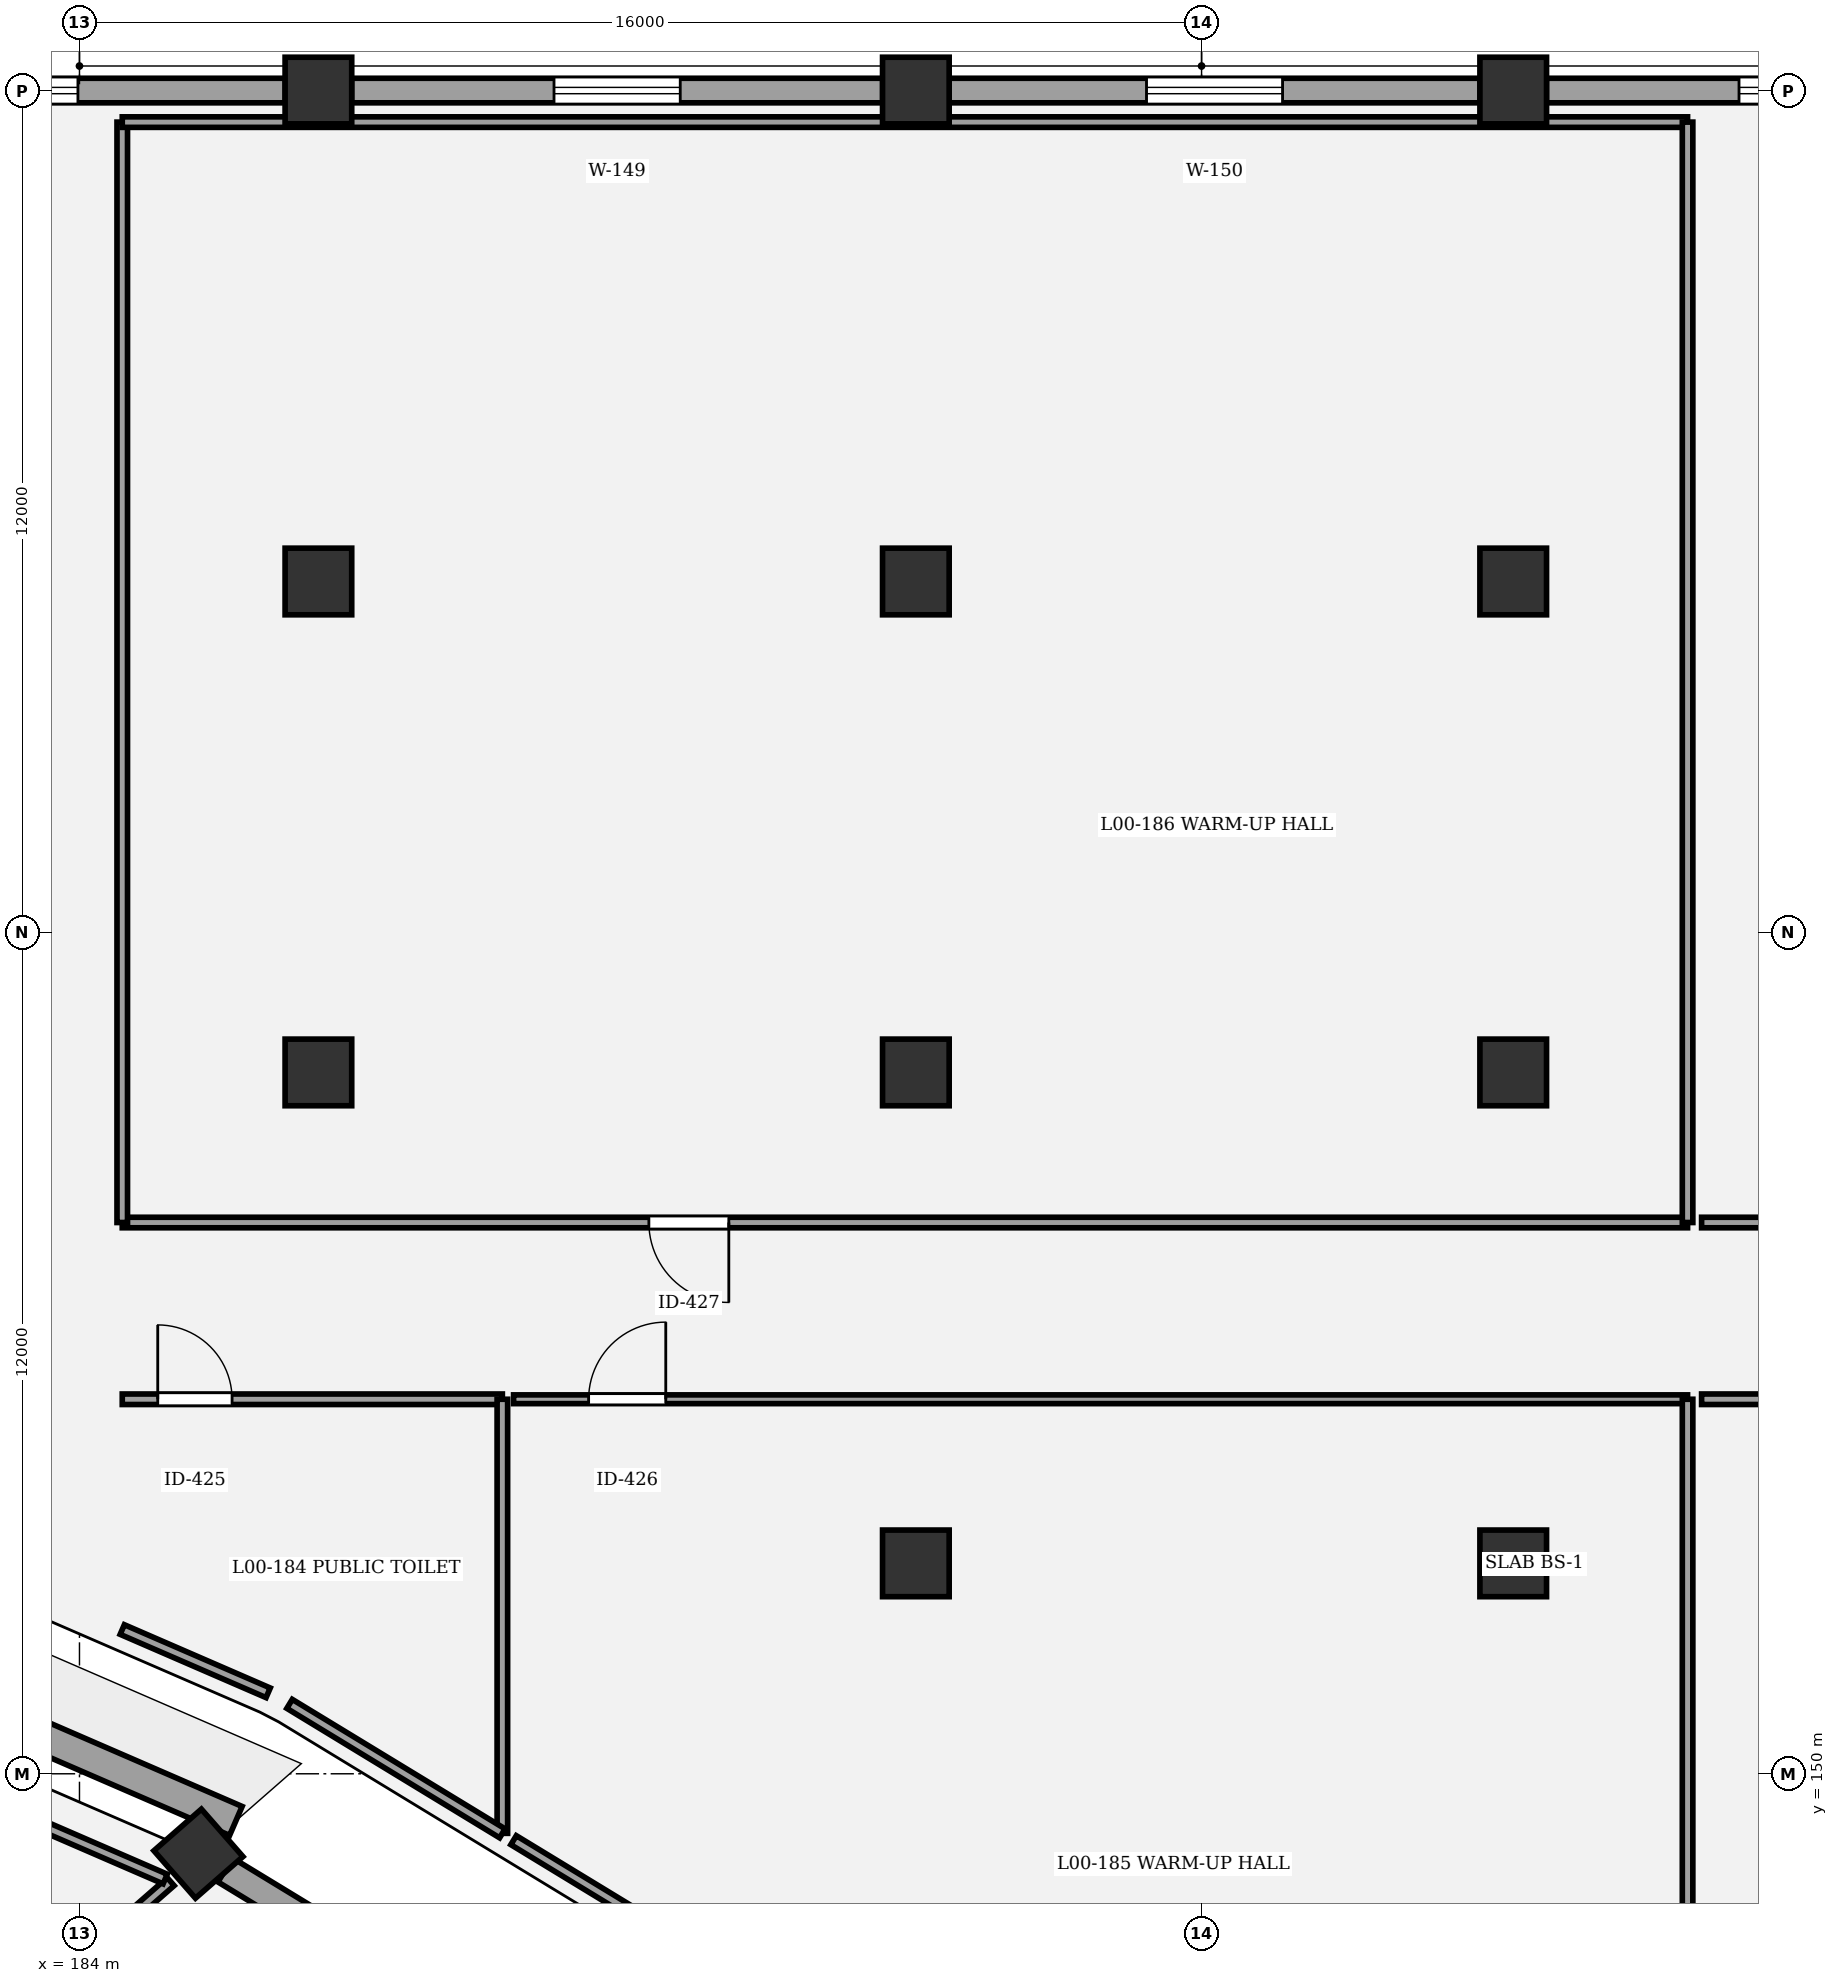
"""IFC4 building model, lengths in metres.
Left out: names, types, materials, properties, quantities, classifications, styles, units other than length and angle.
Written with IfcOpenShell. Run it as: python <this file> out.ifc"""

import sys

from ifc_helpers import new_model, si_unit, direction, frame, frame_2d, origin, origin_2d, place, context, subcontext, project, spatial, rectangle, circle, extrude, element, fill, save


model = new_model("IFC4")
c1 = context("Model", 3, precision=1e-05, world=origin(), true_north=direction((0.0, 1.0)))
c2 = subcontext(c1, "Body", "Model", "MODEL_VIEW")
j1 = project(units=[si_unit("LENGTHUNIT", "METRE"), si_unit("PLANEANGLEUNIT", "RADIAN")], contexts=[c1])
p1 = place(None, origin())
s1 = spatial("IfcSite", under=j1, at=p1, CompositionType="ELEMENT")
p2 = place(p1, origin())
s2 = spatial("IfcBuilding", under=s1, at=p2, CompositionType="ELEMENT")
p3 = place(p2, origin())
s3 = spatial("IfcBuildingStorey", under=s2, at=p3, CompositionType="ELEMENT", Elevation=0.0)
p4 = place(p3, frame((185.696, 148.861, 0.0), z_axis=(0.0, 0.0, 1.0), x_axis=(0.752529860433, 0.658558128912, 0.0)))
e1 = element("IfcColumn", 1, at=p4, inside=s3, PredefinedType="COLUMN", context=c2, shape_type="SweptSolid", body=[
    extrude(rectangle(XDim=0.9, YDim=0.9, at=origin_2d()), origin(), (0.0, 0.0, 1.0), 5.4),
])
for number, where, z_axis, x_axis in (
    (2, (187.407, 160.0, 0.0), (0.0, 0.0, 1.0), (1.0, 0.0, 0.0)),
    (3, (187.407, 167.0, 0.0), (0.0, 0.0, 1.0), (1.0, 0.0, 0.0)),
    (4, (187.407, 174.0, 0.0), (0.0, 0.0, 1.0), (1.0, 0.0, 0.0)),
    (5, (195.926, 153.0, 0.0), (0.0, 0.0, 1.0), (1.0, 0.0, 0.0)),
    (6, (195.926, 160.0, 0.0), (0.0, 0.0, 1.0), (1.0, 0.0, 0.0)),
    (7, (195.926, 167.0, 0.0), (0.0, 0.0, 1.0), (1.0, 0.0, 0.0)),
    (8, (195.926, 174.0, 0.0), (0.0, 0.0, 1.0), (1.0, 0.0, 0.0)),
    (9, (204.444, 153.0, 0.0), (0.0, 0.0, 1.0), (1.0, 0.0, 0.0)),
    (10, (204.444, 160.0, 0.0), (0.0, 0.0, 1.0), (1.0, 0.0, 0.0)),
    (11, (204.444, 167.0, 0.0), (0.0, 0.0, 1.0), (1.0, 0.0, 0.0)),
    (12, (204.444, 174.0, 0.0), (0.0, 0.0, 1.0), (1.0, 0.0, 0.0)),
):
    element("IfcColumn", number, at=place(p3, frame(where, z_axis=z_axis, x_axis=x_axis)), inside=s3, PredefinedType="COLUMN", context=c2, shape_type="SweptSolid", body=[
        extrude(circle(Radius=0.475, at=origin_2d()), origin(), (0.0, 0.0, 1.0), 5.4),
    ])
p5 = place(p3, frame((186.23, 149.328, 0.0), z_axis=(0.0, 0.0, 1.0), x_axis=(-0.917502700529, 0.397729549471, 0.0)))
e13 = element("IfcWall", 13, at=p5, inside=s3, PredefinedType="USERDEFINED", context=c2, shape_type="SweptSolid", body=[
    extrude(rectangle(XDim=10.716, YDim=0.45, at=frame_2d((5.358, 0.0))), origin(), (0.0, 0.0, 1.0), 4.25),
])
p6 = place(p3, frame((186.079, 148.628, 0.0), z_axis=(0.0, 0.0, 1.0), x_axis=(0.854319454423, -0.519748275413, 0.0)))
e14 = element("IfcWall", 14, at=p6, inside=s3, PredefinedType="STANDARD", context=c2, shape_type="SweptSolid", body=[
    extrude(rectangle(XDim=9.006, YDim=0.4, at=frame_2d((4.503, 0.0))), origin(), (0.0, 0.0, 1.0), 4.25),
])
p7 = place(p6, frame((3.303, 0.0, 0.0)))
e15 = element("IfcOpeningElement", 15, at=p7, cuts=e14, PredefinedType="OPENING", context=c2, shape_type="SweptSolid", body=[
    extrude(rectangle(XDim=2.4, YDim=2.55, at=frame_2d((1.2, 1.275))), frame((0.0, 0.21, 0.0), z_axis=(0.0, -1.0, 0.0), x_axis=(1.0, 0.0, 0.0)), (0.0, 0.0, 1.0), 0.42),
])
p8 = place(p3, frame((179.362, 174.0, 0.0), z_axis=(0.0, 0.0, 1.0), x_axis=(1.0, 0.0, 0.0)))
e16 = element("IfcWall", 16, at=p8, inside=s3, PredefinedType="STANDARD", context=c2, shape_type="SweptSolid", body=[
    extrude(rectangle(XDim=7.572, YDim=0.35, at=frame_2d((3.786, 0.0))), origin(), (0.0, 0.0, 1.0), 4.16),
])
p9 = place(p8, frame((2.956, 0.0, 0.9)))
e17 = element("IfcOpeningElement", 17, at=p9, cuts=e16, PredefinedType="OPENING", context=c2, shape_type="SweptSolid", body=[
    extrude(rectangle(XDim=1.66, YDim=1.75, at=frame_2d((0.83, 0.875))), frame((0.0, 0.185, 0.0), z_axis=(0.0, -1.0, 0.0), x_axis=(1.0, 0.0, 0.0)), (0.0, 0.0, 1.0), 0.37),
])
p10 = place(p3, frame((187.88, 174.0, 0.0), z_axis=(0.0, 0.0, 1.0), x_axis=(1.0, 0.0, 0.0)))
e18 = element("IfcWall", 18, at=p10, inside=s3, PredefinedType="STANDARD", context=c2, shape_type="SweptSolid", body=[
    extrude(rectangle(XDim=7.573, YDim=0.35, at=frame_2d((3.787, 0.0))), origin(), (0.0, 0.0, 1.0), 4.16),
])
p11 = place(p10, frame((2.886, 0.0, 0.9)))
e19 = element("IfcOpeningElement", 19, at=p11, cuts=e18, PredefinedType="OPENING", context=c2, shape_type="SweptSolid", body=[
    extrude(rectangle(XDim=1.8, YDim=1.75, at=frame_2d((0.9, 0.875))), frame((0.0, 0.185, 0.0), z_axis=(0.0, -1.0, 0.0), x_axis=(1.0, 0.0, 0.0)), (0.0, 0.0, 1.0), 0.37),
])
p12 = place(p3, frame((196.399, 174.0, 0.0), z_axis=(0.0, 0.0, 1.0), x_axis=(1.0, 0.0, 0.0)))
e20 = element("IfcWall", 20, at=p12, inside=s3, PredefinedType="STANDARD", context=c2, shape_type="SweptSolid", body=[
    extrude(rectangle(XDim=7.572, YDim=0.35, at=frame_2d((3.786, 0.0))), origin(), (0.0, 0.0, 1.0), 4.16),
])
p13 = place(p12, frame((2.816, 0.0, 0.9)))
e21 = element("IfcOpeningElement", 21, at=p13, cuts=e20, PredefinedType="OPENING", context=c2, shape_type="SweptSolid", body=[
    extrude(rectangle(XDim=1.94, YDim=1.75, at=frame_2d((0.97, 0.875))), frame((0.0, 0.185, 0.0), z_axis=(0.0, -1.0, 0.0), x_axis=(1.0, 0.0, 0.0)), (0.0, 0.0, 1.0), 0.37),
])
p14 = place(p3, frame((204.917, 174.0, 0.0), z_axis=(0.0, 0.0, 1.0), x_axis=(1.0, 0.0, 0.0)))
e22 = element("IfcWall", 22, at=p14, inside=s3, PredefinedType="STANDARD", context=c2, shape_type="SweptSolid", body=[
    extrude(rectangle(XDim=7.573, YDim=0.35, at=frame_2d((3.787, 0.0))), origin(), (0.0, 0.0, 1.0), 4.16),
])
p15 = place(p14, frame((2.747, 0.0, 0.9)))
e23 = element("IfcOpeningElement", 23, at=p15, cuts=e22, PredefinedType="OPENING", context=c2, shape_type="SweptSolid", body=[
    extrude(rectangle(XDim=2.08, YDim=1.75, at=frame_2d((1.04, 0.875))), frame((0.0, 0.185, 0.0), z_axis=(0.0, -1.0, 0.0), x_axis=(1.0, 0.0, 0.0)), (0.0, 0.0, 1.0), 0.37),
])
p16 = place(p3, frame((184.61, 155.34, 0.0), z_axis=(0.0, 0.0, 1.0), x_axis=(1.0, 0.0, 0.0)))
e24 = element("IfcWall", 24, at=p16, inside=s3, PredefinedType="PARTITIONING", context=c2, shape_type="SweptSolid", body=[
    extrude(rectangle(XDim=5.42, YDim=0.15, at=frame_2d((2.71, 0.0))), origin(), (0.0, 0.0, 1.0), 4.15),
])
p17 = place(p16, frame((0.506, 0.0, 0.0)))
e25 = element("IfcOpeningElement", 25, at=p17, cuts=e24, PredefinedType="OPENING", context=c2, shape_type="SweptSolid", body=[
    extrude(rectangle(XDim=1.06, YDim=2.3, at=frame_2d((0.53, 1.15))), frame((0.0, 0.085, 0.0), z_axis=(0.0, -1.0, 0.0), x_axis=(1.0, 0.0, 0.0)), (0.0, 0.0, 1.0), 0.17),
])
p18 = place(p3, frame((190.19, 155.34, 0.0), z_axis=(0.0, 0.0, 1.0), x_axis=(1.0, 0.0, 0.0)))
e26 = element("IfcWall", 26, at=p18, inside=s3, PredefinedType="PARTITIONING", context=c2, shape_type="SweptSolid", body=[
    extrude(rectangle(XDim=16.74, YDim=0.125, at=frame_2d((8.37, 0.0))), origin(), (0.0, 0.0, 1.0), 4.15),
])
p19 = place(p18, frame((1.07, 0.0, 0.0)))
e27 = element("IfcOpeningElement", 27, at=p19, cuts=e26, PredefinedType="OPENING", context=c2, shape_type="SweptSolid", body=[
    extrude(rectangle(XDim=1.1, YDim=2.3, at=frame_2d((0.55, 1.15))), frame((0.0, 0.073, 0.0), z_axis=(0.0, -1.0, 0.0), x_axis=(1.0, 0.0, 0.0)), (0.0, 0.0, 1.0), 0.145),
])
p20 = place(p3, frame((206.93, 157.86, 0.0), z_axis=(0.0, 0.0, 1.0), x_axis=(-1.0, 0.0, 0.0)))
e28 = element("IfcWall", 28, at=p20, inside=s3, PredefinedType="PARTITIONING", context=c2, shape_type="SweptSolid", body=[
    extrude(rectangle(XDim=22.32, YDim=0.15, at=frame_2d((11.16, 0.0))), origin(), (0.0, 0.0, 1.0), 4.15),
])
p21 = place(p20, frame((13.671, 0.0, 0.0)))
e29 = element("IfcOpeningElement", 29, at=p21, cuts=e28, PredefinedType="OPENING", context=c2, shape_type="SweptSolid", body=[
    extrude(rectangle(XDim=1.14, YDim=2.3, at=frame_2d((0.57, 1.15))), frame((0.0, 0.085, 0.0), z_axis=(0.0, -1.0, 0.0), x_axis=(1.0, 0.0, 0.0)), (0.0, 0.0, 1.0), 0.17),
])
p22 = place(p3, frame((216.5, 157.86, 0.0), z_axis=(0.0, 0.0, 1.0), x_axis=(-1.0, 0.0, 0.0)))
e30 = element("IfcWall", 30, at=p22, inside=s3, PredefinedType="PARTITIONING", context=c2, shape_type="SweptSolid", body=[
    extrude(rectangle(XDim=9.37, YDim=0.15, at=frame_2d((4.685, 0.0))), origin(), (0.0, 0.0, 1.0), 4.15),
])
p23 = place(p22, frame((6.964, 0.0, 0.0)))
e31 = element("IfcOpeningElement", 31, at=p23, cuts=e30, PredefinedType="OPENING", context=c2, shape_type="SweptSolid", body=[
    extrude(rectangle(XDim=1.18, YDim=2.3, at=frame_2d((0.59, 1.15))), frame((0.0, 0.085, 0.0), z_axis=(0.0, -1.0, 0.0), x_axis=(1.0, 0.0, 0.0)), (0.0, 0.0, 1.0), 0.17),
])
p24 = place(p3, frame((179.895, 143.731, 0.0), z_axis=(0.0, 0.0, 1.0), x_axis=(0.752564061831, 0.658519045162, 0.0)))
e32 = element("IfcWall", 32, at=p24, inside=s3, PredefinedType="PARTITIONING", context=c2, shape_type="SweptSolid", body=[
    extrude(rectangle(XDim=7.183, YDim=0.15, at=frame_2d((3.592, 0.0))), origin(), (0.0, 0.0, 1.0), 4.15),
])
p25 = place(p3, frame((176.189, 152.415, 0.0), z_axis=(0.0, 0.0, 1.0), x_axis=(0.917505556499, -0.397722961109, 0.0)))
e33 = element("IfcWall", 33, at=p25, inside=s3, PredefinedType="PARTITIONING", context=c2, shape_type="SweptSolid", body=[
    extrude(rectangle(XDim=9.845, YDim=0.15, at=frame_2d((4.922, 0.0))), origin(), (0.0, 0.0, 1.0), 4.15),
])
p26 = place(p3, frame((186.69, 151.155, 0.0), z_axis=(0.0, 0.0, 1.0), x_axis=(-0.917454774934, 0.397840088415, 0.0)))
e34 = element("IfcWall", 34, at=p26, inside=s3, PredefinedType="PARTITIONING", context=c2, shape_type="SweptSolid", body=[
    extrude(rectangle(XDim=2.268, YDim=0.15, at=frame_2d((1.134, 0.0))), origin(), (0.0, 0.0, 1.0), 4.15),
])
p27 = place(p3, frame((190.03, 155.34, 0.0), z_axis=(0.0, 0.0, 1.0), x_axis=(0.0, -1.0, 0.0)))
e35 = element("IfcWall", 35, at=p27, inside=s3, PredefinedType="PARTITIONING", context=c2, shape_type="SweptSolid", body=[
    extrude(rectangle(XDim=6.189, YDim=0.15, at=frame_2d((3.095, 0.0))), origin(), (0.0, 0.0, 1.0), 4.15),
])
p28 = place(p3, frame((190.03, 149.151, 0.0), z_axis=(0.0, 0.0, 1.0), x_axis=(-0.854335242099, 0.519722324042, 0.0)))
e36 = element("IfcWall", 36, at=p28, inside=s3, PredefinedType="PARTITIONING", context=c2, shape_type="SweptSolid", body=[
    extrude(rectangle(XDim=3.552, YDim=0.15, at=frame_2d((1.776, 0.0))), origin(), (0.0, 0.0, 1.0), 4.15),
])
p29 = place(p3, frame((195.455, 145.85, 0.0), z_axis=(0.0, 0.0, 1.0), x_axis=(-0.854341575167, 0.519711913411, 0.0)))
e37 = element("IfcWall", 37, at=p29, inside=s3, PredefinedType="PARTITIONING", context=c2, shape_type="SweptSolid", body=[
    extrude(rectangle(XDim=6.163, YDim=0.15, at=frame_2d((3.082, 0.0))), origin(), (0.0, 0.0, 1.0), 4.15),
])
p30 = place(p3, frame((206.93, 155.34, 0.0), z_axis=(0.0, 0.0, 1.0), x_axis=(0.0, -1.0, 0.0)))
e38 = element("IfcWall", 38, at=p30, inside=s3, PredefinedType="PARTITIONING", context=c2, shape_type="SweptSolid", body=[
    extrude(rectangle(XDim=20.434, YDim=0.15, at=frame_2d((10.217, 0.0))), origin(), (0.0, 0.0, 1.0), 4.15),
])
p31 = place(p3, frame((184.61, 157.86, 0.0), z_axis=(0.0, 0.0, 1.0), x_axis=(0.0, 1.0, 0.0)))
e39 = element("IfcWall", 39, at=p31, inside=s3, PredefinedType="PARTITIONING", context=c2, shape_type="SweptSolid", body=[
    extrude(rectangle(XDim=15.69, YDim=0.15, at=frame_2d((7.845, 0.0))), origin(), (0.0, 0.0, 1.0), 4.15),
])
p32 = place(p3, frame((184.61, 173.55, 0.0), z_axis=(0.0, 0.0, 1.0), x_axis=(1.0, 0.0, 0.0)))
e40 = element("IfcWall", 40, at=p32, inside=s3, PredefinedType="PARTITIONING", context=c2, shape_type="SweptSolid", body=[
    extrude(rectangle(XDim=22.32, YDim=0.15, at=frame_2d((11.16, 0.0))), origin(), (0.0, 0.0, 1.0), 4.15),
])
p33 = place(p3, frame((206.93, 173.55, 0.0), z_axis=(0.0, 0.0, 1.0), x_axis=(0.0, -1.0, 0.0)))
e41 = element("IfcWall", 41, at=p33, inside=s3, PredefinedType="PARTITIONING", context=c2, shape_type="SweptSolid", body=[
    extrude(rectangle(XDim=15.69, YDim=0.15, at=frame_2d((7.845, 0.0))), origin(), (0.0, 0.0, 1.0), 4.15),
])
p34 = place(p3, frame((207.13, 155.34, 0.0), z_axis=(0.0, 0.0, 1.0), x_axis=(0.999999951445, 0.000311623544, 0.0)))
e42 = element("IfcWall", 42, at=p34, inside=s3, PredefinedType="PARTITIONING", context=c2, shape_type="SweptSolid", body=[
    extrude(rectangle(XDim=9.401, YDim=0.15, at=frame_2d((4.701, 0.0))), origin(), (0.0, 0.0, 1.0), 4.15),
])
p35 = place(p9, origin())
e43 = element("IfcWindow", 43, at=p35, inside=s3, PartitioningType="SINGLE_PANEL", PredefinedType="WINDOW", context=c2, shape_type="SweptSolid", body=[
    extrude(rectangle(XDim=1.66, YDim=1.75, at=frame_2d((0.83, 0.875))), frame((0.0, 0.03, 0.0), z_axis=(0.0, -1.0, 0.0), x_axis=(1.0, 0.0, 0.0)), (0.0, 0.0, 1.0), 0.06),
])
fill(e17, e43)
p36 = place(p11, origin())
e44 = element("IfcWindow", 44, at=p36, inside=s3, PartitioningType="SINGLE_PANEL", PredefinedType="WINDOW", context=c2, shape_type="SweptSolid", body=[
    extrude(rectangle(XDim=1.8, YDim=1.75, at=frame_2d((0.9, 0.875))), frame((0.0, 0.03, 0.0), z_axis=(0.0, -1.0, 0.0), x_axis=(1.0, 0.0, 0.0)), (0.0, 0.0, 1.0), 0.06),
])
fill(e19, e44)
p37 = place(p13, origin())
e45 = element("IfcWindow", 45, at=p37, inside=s3, PartitioningType="SINGLE_PANEL", PredefinedType="WINDOW", context=c2, shape_type="SweptSolid", body=[
    extrude(rectangle(XDim=1.94, YDim=1.75, at=frame_2d((0.97, 0.875))), frame((0.0, 0.03, 0.0), z_axis=(0.0, -1.0, 0.0), x_axis=(1.0, 0.0, 0.0)), (0.0, 0.0, 1.0), 0.06),
])
fill(e21, e45)
p38 = place(p15, origin())
e46 = element("IfcWindow", 46, at=p38, inside=s3, PartitioningType="SINGLE_PANEL", PredefinedType="WINDOW", context=c2, shape_type="SweptSolid", body=[
    extrude(rectangle(XDim=2.08, YDim=1.75, at=frame_2d((1.04, 0.875))), frame((0.0, 0.03, 0.0), z_axis=(0.0, -1.0, 0.0), x_axis=(1.0, 0.0, 0.0)), (0.0, 0.0, 1.0), 0.06),
])
fill(e23, e46)
p39 = place(p17, origin())
e47 = element("IfcDoor", 47, at=p39, inside=s3, OperationType="SINGLE_SWING_LEFT", PredefinedType="DOOR", context=c2, shape_type="SweptSolid", body=[
    extrude(rectangle(XDim=1.06, YDim=2.3, at=frame_2d((0.53, 1.15))), frame((0.0, 0.025, 0.0), z_axis=(0.0, -1.0, 0.0), x_axis=(1.0, 0.0, 0.0)), (0.0, 0.0, 1.0), 0.05),
])
fill(e25, e47)
p40 = place(p19, origin())
e48 = element("IfcDoor", 48, at=p40, inside=s3, OperationType="SINGLE_SWING_RIGHT", PredefinedType="DOOR", context=c2, shape_type="SweptSolid", body=[
    extrude(rectangle(XDim=1.1, YDim=2.3, at=frame_2d((0.55, 1.15))), frame((0.0, 0.025, 0.0), z_axis=(0.0, -1.0, 0.0), x_axis=(1.0, 0.0, 0.0)), (0.0, 0.0, 1.0), 0.05),
])
fill(e27, e48)
p41 = place(p21, origin())
e49 = element("IfcDoor", 49, at=p41, inside=s3, OperationType="SINGLE_SWING_LEFT", PredefinedType="DOOR", context=c2, shape_type="SweptSolid", body=[
    extrude(rectangle(XDim=1.14, YDim=2.3, at=frame_2d((0.57, 1.15))), frame((0.0, 0.025, 0.0), z_axis=(0.0, -1.0, 0.0), x_axis=(1.0, 0.0, 0.0)), (0.0, 0.0, 1.0), 0.05),
])
fill(e29, e49)
save(model, sys.argv[1])
